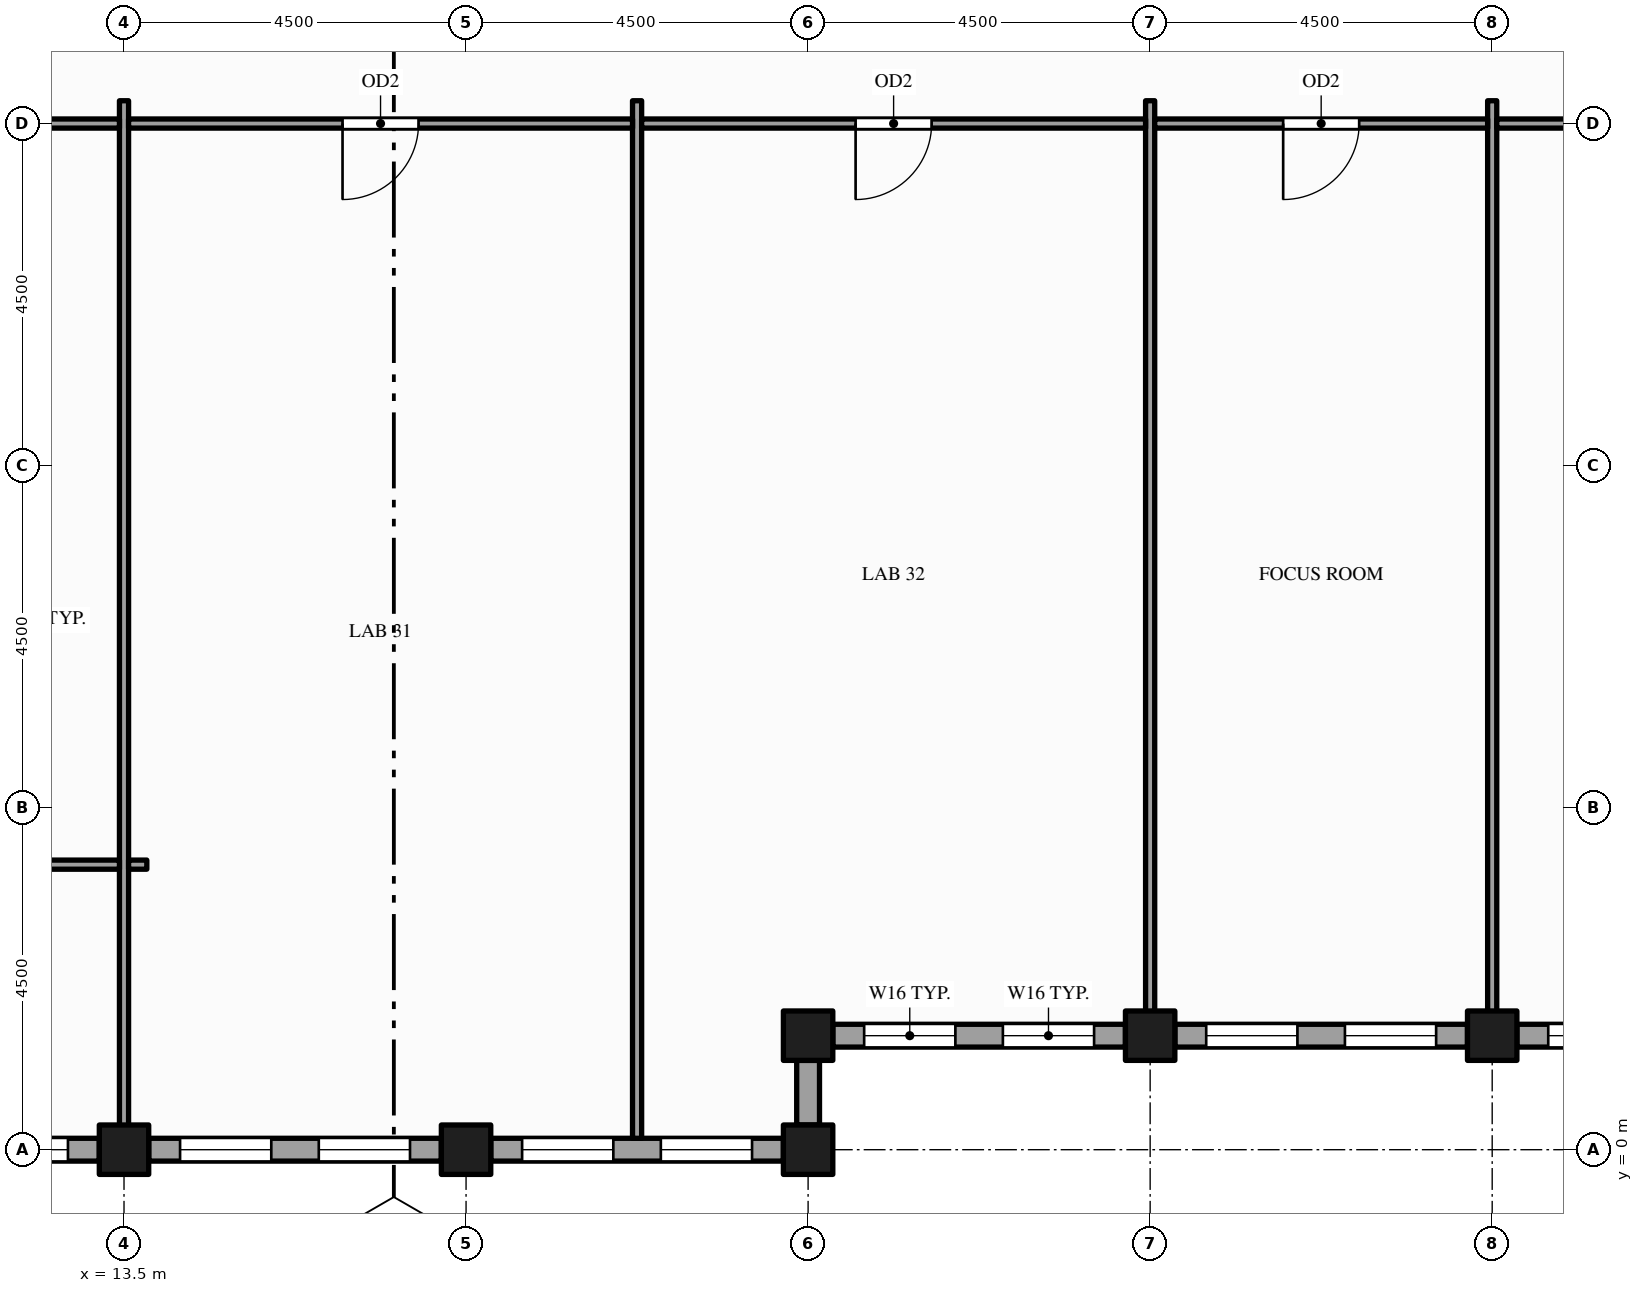
"""IFC4 building model, lengths in metres.
Left out: names, types, materials, properties, quantities, classifications, styles, units other than length and angle.
Written with IfcOpenShell. Run it as: python <this file> out.ifc"""

import sys

from ifc_helpers import new_model, si_unit, direction, frame, frame_2d, origin, origin_2d, place, context, subcontext, project, spatial, rectangle, hollow_rectangle, extrude, element, fill, save


model = new_model("IFC4")
c1 = context("Model", 3, precision=1e-05, world=origin(), true_north=direction((0.0, 1.0)))
c2 = subcontext(c1, "Body", "Model", "MODEL_VIEW")
j1 = project(units=[si_unit("LENGTHUNIT", "METRE"), si_unit("PLANEANGLEUNIT", "RADIAN")], contexts=[c1])
p1 = place(None, origin())
s1 = spatial("IfcSite", under=j1, at=p1, CompositionType="ELEMENT")
p2 = place(p1, origin())
s2 = spatial("IfcBuilding", under=s1, at=p2, CompositionType="ELEMENT")
p3 = place(p2, frame((0.0, 0.0, 281.0)))
s3 = spatial("IfcBuildingStorey", under=s2, at=p3, CompositionType="ELEMENT", Elevation=281.0)
for number, where, z_axis, x_axis in (
    (1, (13.5, 0.0, -0.15), (0.0, 0.0, 1.0), (1.0, 0.0, 0.0)),
    (2, (18.0, 0.0, -0.15), (0.0, 0.0, 1.0), (1.0, 0.0, 0.0)),
    (3, (22.5, 0.0, -0.15), (0.0, 0.0, 1.0), (1.0, 0.0, 0.0)),
    (4, (22.5, 1.5, -0.15), (0.0, 0.0, 1.0), (1.0, 0.0, 0.0)),
    (5, (27.0, 1.5, -0.15), (0.0, 0.0, 1.0), (1.0, 0.0, 0.0)),
    (6, (31.5, 1.5, -0.15), (0.0, 0.0, 1.0), (1.0, 0.0, 0.0)),
):
    element("IfcColumn", number, at=place(p3, frame(where, z_axis=z_axis, x_axis=x_axis)), inside=s3, PredefinedType="COLUMN", context=c2, shape_type="SweptSolid", body=[
        extrude(hollow_rectangle(XDim=0.65, YDim=0.65, WallThickness=0.032, at=origin_2d()), origin(), (0.0, 0.0, 1.0), 4.0),
    ])
p4 = place(p3, frame((22.5, 0.325, 0.0), z_axis=(0.0, 0.0, 1.0), x_axis=(0.0, 1.0, 0.0)))
e7 = element("IfcWall", 7, at=p4, inside=s3, PredefinedType="STANDARD", context=c2, shape_type="SweptSolid", body=[
    extrude(rectangle(XDim=0.85, YDim=0.3, at=frame_2d((0.425, 0.0))), origin(), (0.0, 0.0, 1.0), 3.162),
])
p5 = place(p3, frame((22.825, 1.5, 0.0), z_axis=(0.0, 0.0, 1.0), x_axis=(1.0, 0.0, 0.0)))
e8 = element("IfcWall", 8, at=p5, inside=s3, PredefinedType="STANDARD", context=c2, shape_type="SweptSolid", body=[
    extrude(rectangle(XDim=3.85, YDim=0.3, at=frame_2d((1.925, 0.0))), origin(), (0.0, 0.0, 1.0), 2.87),
])
p6 = place(p5, frame((0.413, 0.0, 0.9)))
e9 = element("IfcOpeningElement", 9, at=p6, cuts=e8, PredefinedType="OPENING", context=c2, shape_type="SweptSolid", body=[
    extrude(rectangle(XDim=1.2, YDim=1.75, at=frame_2d((0.6, 0.875))), frame((0.0, 0.16, 0.0), z_axis=(0.0, -1.0, 0.0), x_axis=(1.0, 0.0, 0.0)), (0.0, 0.0, 1.0), 0.32),
])
p7 = place(p5, frame((2.238, 0.0, 0.9)))
e10 = element("IfcOpeningElement", 10, at=p7, cuts=e8, PredefinedType="OPENING", context=c2, shape_type="SweptSolid", body=[
    extrude(rectangle(XDim=1.2, YDim=1.75, at=frame_2d((0.6, 0.875))), frame((0.0, 0.16, 0.0), z_axis=(0.0, -1.0, 0.0), x_axis=(1.0, 0.0, 0.0)), (0.0, 0.0, 1.0), 0.32),
])
p8 = place(p3, frame((27.325, 1.5, 0.0), z_axis=(0.0, 0.0, 1.0), x_axis=(1.0, 0.0, 0.0)))
e11 = element("IfcWall", 11, at=p8, inside=s3, PredefinedType="STANDARD", context=c2, shape_type="SweptSolid", body=[
    extrude(rectangle(XDim=3.85, YDim=0.3, at=frame_2d((1.925, 0.0))), origin(), (0.0, 0.0, 1.0), 2.87),
])
p9 = place(p8, frame((0.413, 0.0, 0.9)))
e12 = element("IfcOpeningElement", 12, at=p9, cuts=e11, PredefinedType="OPENING", context=c2, shape_type="SweptSolid", body=[
    extrude(rectangle(XDim=1.2, YDim=1.75, at=frame_2d((0.6, 0.875))), frame((0.0, 0.16, 0.0), z_axis=(0.0, -1.0, 0.0), x_axis=(1.0, 0.0, 0.0)), (0.0, 0.0, 1.0), 0.32),
])
p10 = place(p8, frame((2.238, 0.0, 0.9)))
e13 = element("IfcOpeningElement", 13, at=p10, cuts=e11, PredefinedType="OPENING", context=c2, shape_type="SweptSolid", body=[
    extrude(rectangle(XDim=1.2, YDim=1.75, at=frame_2d((0.6, 0.875))), frame((0.0, 0.16, 0.0), z_axis=(0.0, -1.0, 0.0), x_axis=(1.0, 0.0, 0.0)), (0.0, 0.0, 1.0), 0.32),
])
p11 = place(p3, frame((31.825, 1.5, 0.0), z_axis=(0.0, 0.0, 1.0), x_axis=(1.0, 0.0, 0.0)))
e14 = element("IfcWall", 14, at=p11, inside=s3, PredefinedType="STANDARD", context=c2, shape_type="SweptSolid", body=[
    extrude(rectangle(XDim=3.85, YDim=0.3, at=frame_2d((1.925, 0.0))), origin(), (0.0, 0.0, 1.0), 2.87),
])
p12 = place(p11, frame((0.413, 0.0, 0.9)))
e15 = element("IfcOpeningElement", 15, at=p12, cuts=e14, PredefinedType="OPENING", context=c2, shape_type="SweptSolid", body=[
    extrude(rectangle(XDim=1.2, YDim=1.75, at=frame_2d((0.6, 0.875))), frame((0.0, 0.16, 0.0), z_axis=(0.0, -1.0, 0.0), x_axis=(1.0, 0.0, 0.0)), (0.0, 0.0, 1.0), 0.32),
])
p13 = place(p11, frame((2.238, 0.0, 0.9)))
e16 = element("IfcOpeningElement", 16, at=p13, cuts=e14, PredefinedType="OPENING", context=c2, shape_type="SweptSolid", body=[
    extrude(rectangle(XDim=1.2, YDim=1.75, at=frame_2d((0.6, 0.875))), frame((0.0, 0.16, 0.0), z_axis=(0.0, -1.0, 0.0), x_axis=(1.0, 0.0, 0.0)), (0.0, 0.0, 1.0), 0.32),
])
p14 = place(p3, frame((9.325, 0.0, 0.0), z_axis=(0.0, 0.0, 1.0), x_axis=(1.0, 0.0, 0.0)))
e17 = element("IfcWall", 17, at=p14, inside=s3, PredefinedType="STANDARD", context=c2, shape_type="SweptSolid", body=[
    extrude(rectangle(XDim=3.85, YDim=0.3, at=frame_2d((1.925, 0.0))), origin(), (0.0, 0.0, 1.0), 2.87),
])
p15 = place(p14, frame((0.413, 0.0, 0.9)))
e18 = element("IfcOpeningElement", 18, at=p15, cuts=e17, PredefinedType="OPENING", context=c2, shape_type="SweptSolid", body=[
    extrude(rectangle(XDim=1.2, YDim=1.75, at=frame_2d((0.6, 0.875))), frame((0.0, 0.16, 0.0), z_axis=(0.0, -1.0, 0.0), x_axis=(1.0, 0.0, 0.0)), (0.0, 0.0, 1.0), 0.32),
])
p16 = place(p14, frame((2.238, 0.0, 0.9)))
e19 = element("IfcOpeningElement", 19, at=p16, cuts=e17, PredefinedType="OPENING", context=c2, shape_type="SweptSolid", body=[
    extrude(rectangle(XDim=1.2, YDim=1.75, at=frame_2d((0.6, 0.875))), frame((0.0, 0.16, 0.0), z_axis=(0.0, -1.0, 0.0), x_axis=(1.0, 0.0, 0.0)), (0.0, 0.0, 1.0), 0.32),
])
p17 = place(p3, frame((13.825, 0.0, 0.0), z_axis=(0.0, 0.0, 1.0), x_axis=(1.0, 0.0, 0.0)))
e20 = element("IfcWall", 20, at=p17, inside=s3, PredefinedType="STANDARD", context=c2, shape_type="SweptSolid", body=[
    extrude(rectangle(XDim=3.85, YDim=0.3, at=frame_2d((1.925, 0.0))), origin(), (0.0, 0.0, 1.0), 2.87),
])
p18 = place(p17, frame((0.413, 0.0, 0.9)))
e21 = element("IfcOpeningElement", 21, at=p18, cuts=e20, PredefinedType="OPENING", context=c2, shape_type="SweptSolid", body=[
    extrude(rectangle(XDim=1.2, YDim=1.75, at=frame_2d((0.6, 0.875))), frame((0.0, 0.16, 0.0), z_axis=(0.0, -1.0, 0.0), x_axis=(1.0, 0.0, 0.0)), (0.0, 0.0, 1.0), 0.32),
])
p19 = place(p17, frame((2.238, 0.0, 0.9)))
e22 = element("IfcOpeningElement", 22, at=p19, cuts=e20, PredefinedType="OPENING", context=c2, shape_type="SweptSolid", body=[
    extrude(rectangle(XDim=1.2, YDim=1.75, at=frame_2d((0.6, 0.875))), frame((0.0, 0.16, 0.0), z_axis=(0.0, -1.0, 0.0), x_axis=(1.0, 0.0, 0.0)), (0.0, 0.0, 1.0), 0.32),
])
p20 = place(p3, frame((18.325, 0.0, 0.0), z_axis=(0.0, 0.0, 1.0), x_axis=(1.0, 0.0, 0.0)))
e23 = element("IfcWall", 23, at=p20, inside=s3, PredefinedType="STANDARD", context=c2, shape_type="SweptSolid", body=[
    extrude(rectangle(XDim=3.85, YDim=0.3, at=frame_2d((1.925, 0.0))), origin(), (0.0, 0.0, 1.0), 2.87),
])
p21 = place(p20, frame((0.413, 0.0, 0.9)))
e24 = element("IfcOpeningElement", 24, at=p21, cuts=e23, PredefinedType="OPENING", context=c2, shape_type="SweptSolid", body=[
    extrude(rectangle(XDim=1.2, YDim=1.75, at=frame_2d((0.6, 0.875))), frame((0.0, 0.16, 0.0), z_axis=(0.0, -1.0, 0.0), x_axis=(1.0, 0.0, 0.0)), (0.0, 0.0, 1.0), 0.32),
])
p22 = place(p20, frame((2.238, 0.0, 0.9)))
e25 = element("IfcOpeningElement", 25, at=p22, cuts=e23, PredefinedType="OPENING", context=c2, shape_type="SweptSolid", body=[
    extrude(rectangle(XDim=1.2, YDim=1.75, at=frame_2d((0.6, 0.875))), frame((0.0, 0.16, 0.0), z_axis=(0.0, -1.0, 0.0), x_axis=(1.0, 0.0, 0.0)), (0.0, 0.0, 1.0), 0.32),
])
for number, where, z_axis, x_axis in (
    (26, (13.5, 0.15, 0.0), (0.0, 0.0, 1.0), (0.0, 1.0, 0.0)),
    (27, (20.25, 0.15, 0.0), (0.0, 0.0, 1.0), (0.0, 1.0, 0.0)),
):
    element("IfcWall", number, at=place(p3, frame(where, z_axis=z_axis, x_axis=x_axis)), inside=s3, PredefinedType="PARTITIONING", context=c2, shape_type="SweptSolid", body=[
        extrude(rectangle(XDim=13.65, YDim=0.12, at=frame_2d((6.825, 0.0))), origin(), (0.0, 0.0, 1.0), 2.87),
    ])
for number, where, z_axis, x_axis in (
    (28, (27.0, 1.65, 0.0), (0.0, 0.0, 1.0), (0.0, 1.0, 0.0)),
    (29, (31.5, 1.65, 0.0), (0.0, 0.0, 1.0), (0.0, 1.0, 0.0)),
):
    element("IfcWall", number, at=place(p3, frame(where, z_axis=z_axis, x_axis=x_axis)), inside=s3, PredefinedType="PARTITIONING", context=c2, shape_type="SweptSolid", body=[
        extrude(rectangle(XDim=12.15, YDim=0.12, at=frame_2d((6.075, 0.0))), origin(), (0.0, 0.0, 1.0), 2.87),
    ])
p23 = place(p3, frame((9.125, 3.75, 0.0), z_axis=(0.0, 0.0, 1.0), x_axis=(1.0, 0.0, 0.0)))
e30 = element("IfcWall", 30, at=p23, inside=s3, PredefinedType="PARTITIONING", context=c2, shape_type="SweptSolid", body=[
    extrude(rectangle(XDim=4.315, YDim=0.12, at=frame_2d((2.157, 0.0))), origin(), (0.0, 0.0, 1.0), 2.87),
])
p24 = place(p3, frame((13.56, 3.75, 0.0), z_axis=(0.0, 0.0, 1.0), x_axis=(1.0, 0.0, 0.0)))
e31 = element("IfcWall", 31, at=p24, inside=s3, PredefinedType="PARTITIONING", context=c2, shape_type="SweptSolid", body=[
    extrude(rectangle(XDim=0.24, YDim=0.12, at=frame_2d((0.12, 0.0))), origin(), (0.0, 0.0, 1.0), 2.87),
])
p25 = place(p3, frame((0.15, 13.5, 0.0), z_axis=(0.0, 0.0, 1.0), x_axis=(1.0, 0.0, 0.0)))
e32 = element("IfcWall", 32, at=p25, inside=s3, PredefinedType="PARTITIONING", context=c2, shape_type="SweptSolid", body=[
    extrude(rectangle(XDim=13.29, YDim=0.12, at=frame_2d((6.645, 0.0))), origin(), (0.0, 0.0, 1.0), 2.87),
])
p26 = place(p25, frame((6.055, 0.0, 0.0)))
e33 = element("IfcOpeningElement", 33, at=p26, cuts=e32, PredefinedType="OPENING", context=c2, shape_type="SweptSolid", body=[
    extrude(rectangle(XDim=1.2, YDim=2.1, at=frame_2d((0.6, 1.05))), frame((0.0, 0.07, 0.0), z_axis=(0.0, -1.0, 0.0), x_axis=(1.0, 0.0, 0.0)), (0.0, 0.0, 1.0), 0.14),
])
p27 = place(p3, frame((13.56, 13.5, 0.0), z_axis=(0.0, 0.0, 1.0), x_axis=(1.0, 0.0, 0.0)))
e34 = element("IfcWall", 34, at=p27, inside=s3, PredefinedType="PARTITIONING", context=c2, shape_type="SweptSolid", body=[
    extrude(rectangle(XDim=6.63, YDim=0.12, at=frame_2d((3.315, 0.0))), origin(), (0.0, 0.0, 1.0), 2.87),
])
p28 = place(p27, frame((2.815, 0.0, 0.0)))
e35 = element("IfcOpeningElement", 35, at=p28, cuts=e34, PredefinedType="OPENING", context=c2, shape_type="SweptSolid", body=[
    extrude(rectangle(XDim=1.0, YDim=2.1, at=frame_2d((0.5, 1.05))), frame((0.0, 0.07, 0.0), z_axis=(0.0, -1.0, 0.0), x_axis=(1.0, 0.0, 0.0)), (0.0, 0.0, 1.0), 0.14),
])
p29 = place(p3, frame((20.31, 13.5, 0.0), z_axis=(0.0, 0.0, 1.0), x_axis=(1.0, 0.0, 0.0)))
e36 = element("IfcWall", 36, at=p29, inside=s3, PredefinedType="PARTITIONING", context=c2, shape_type="SweptSolid", body=[
    extrude(rectangle(XDim=6.63, YDim=0.12, at=frame_2d((3.315, 0.0))), origin(), (0.0, 0.0, 1.0), 2.87),
])
p30 = place(p29, frame((2.815, 0.0, 0.0)))
e37 = element("IfcOpeningElement", 37, at=p30, cuts=e36, PredefinedType="OPENING", context=c2, shape_type="SweptSolid", body=[
    extrude(rectangle(XDim=1.0, YDim=2.1, at=frame_2d((0.5, 1.05))), frame((0.0, 0.07, 0.0), z_axis=(0.0, -1.0, 0.0), x_axis=(1.0, 0.0, 0.0)), (0.0, 0.0, 1.0), 0.14),
])
p31 = place(p3, frame((27.06, 13.5, 0.0), z_axis=(0.0, 0.0, 1.0), x_axis=(1.0, 0.0, 0.0)))
e38 = element("IfcWall", 38, at=p31, inside=s3, PredefinedType="PARTITIONING", context=c2, shape_type="SweptSolid", body=[
    extrude(rectangle(XDim=4.38, YDim=0.12, at=frame_2d((2.19, 0.0))), origin(), (0.0, 0.0, 1.0), 2.87),
])
p32 = place(p31, frame((1.69, 0.0, 0.0)))
e39 = element("IfcOpeningElement", 39, at=p32, cuts=e38, PredefinedType="OPENING", context=c2, shape_type="SweptSolid", body=[
    extrude(rectangle(XDim=1.0, YDim=2.1, at=frame_2d((0.5, 1.05))), frame((0.0, 0.07, 0.0), z_axis=(0.0, -1.0, 0.0), x_axis=(1.0, 0.0, 0.0)), (0.0, 0.0, 1.0), 0.14),
])
p33 = place(p3, frame((31.56, 13.5, 0.0), z_axis=(0.0, 0.0, 1.0), x_axis=(1.0, 0.0, 0.0)))
e40 = element("IfcWall", 40, at=p33, inside=s3, PredefinedType="PARTITIONING", context=c2, shape_type="SweptSolid", body=[
    extrude(rectangle(XDim=4.38, YDim=0.12, at=frame_2d((2.19, 0.0))), origin(), (0.0, 0.0, 1.0), 2.87),
])
p34 = place(p33, frame((1.59, 0.0, 0.0)))
e41 = element("IfcOpeningElement", 41, at=p34, cuts=e40, PredefinedType="OPENING", context=c2, shape_type="SweptSolid", body=[
    extrude(rectangle(XDim=1.2, YDim=2.1, at=frame_2d((0.6, 1.05))), frame((0.0, 0.07, 0.0), z_axis=(0.0, -1.0, 0.0), x_axis=(1.0, 0.0, 0.0)), (0.0, 0.0, 1.0), 0.14),
])
p35 = place(p6, origin())
e42 = element("IfcWindow", 42, at=p35, inside=s3, PartitioningType="SINGLE_PANEL", PredefinedType="WINDOW", context=c2, shape_type="SweptSolid", body=[
    extrude(rectangle(XDim=1.2, YDim=1.75, at=frame_2d((0.6, 0.875))), frame((0.0, 0.03, 0.0), z_axis=(0.0, -1.0, 0.0), x_axis=(1.0, 0.0, 0.0)), (0.0, 0.0, 1.0), 0.06),
])
fill(e9, e42)
p36 = place(p7, origin())
e43 = element("IfcWindow", 43, at=p36, inside=s3, PartitioningType="SINGLE_PANEL", PredefinedType="WINDOW", context=c2, shape_type="SweptSolid", body=[
    extrude(rectangle(XDim=1.2, YDim=1.75, at=frame_2d((0.6, 0.875))), frame((0.0, 0.03, 0.0), z_axis=(0.0, -1.0, 0.0), x_axis=(1.0, 0.0, 0.0)), (0.0, 0.0, 1.0), 0.06),
])
fill(e10, e43)
p37 = place(p9, origin())
e44 = element("IfcWindow", 44, at=p37, inside=s3, PartitioningType="SINGLE_PANEL", PredefinedType="WINDOW", context=c2, shape_type="SweptSolid", body=[
    extrude(rectangle(XDim=1.2, YDim=1.75, at=frame_2d((0.6, 0.875))), frame((0.0, 0.03, 0.0), z_axis=(0.0, -1.0, 0.0), x_axis=(1.0, 0.0, 0.0)), (0.0, 0.0, 1.0), 0.06),
])
fill(e12, e44)
p38 = place(p10, origin())
e45 = element("IfcWindow", 45, at=p38, inside=s3, PartitioningType="SINGLE_PANEL", PredefinedType="WINDOW", context=c2, shape_type="SweptSolid", body=[
    extrude(rectangle(XDim=1.2, YDim=1.75, at=frame_2d((0.6, 0.875))), frame((0.0, 0.03, 0.0), z_axis=(0.0, -1.0, 0.0), x_axis=(1.0, 0.0, 0.0)), (0.0, 0.0, 1.0), 0.06),
])
fill(e13, e45)
p39 = place(p12, origin())
e46 = element("IfcWindow", 46, at=p39, inside=s3, PartitioningType="SINGLE_PANEL", PredefinedType="WINDOW", context=c2, shape_type="SweptSolid", body=[
    extrude(rectangle(XDim=1.2, YDim=1.75, at=frame_2d((0.6, 0.875))), frame((0.0, 0.03, 0.0), z_axis=(0.0, -1.0, 0.0), x_axis=(1.0, 0.0, 0.0)), (0.0, 0.0, 1.0), 0.06),
])
fill(e15, e46)
p40 = place(p16, origin())
e47 = element("IfcWindow", 47, at=p40, inside=s3, PartitioningType="SINGLE_PANEL", PredefinedType="WINDOW", context=c2, shape_type="SweptSolid", body=[
    extrude(rectangle(XDim=1.2, YDim=1.75, at=frame_2d((0.6, 0.875))), frame((0.0, 0.03, 0.0), z_axis=(0.0, -1.0, 0.0), x_axis=(1.0, 0.0, 0.0)), (0.0, 0.0, 1.0), 0.06),
])
fill(e19, e47)
p41 = place(p18, origin())
e48 = element("IfcWindow", 48, at=p41, inside=s3, PartitioningType="SINGLE_PANEL", PredefinedType="WINDOW", context=c2, shape_type="SweptSolid", body=[
    extrude(rectangle(XDim=1.2, YDim=1.75, at=frame_2d((0.6, 0.875))), frame((0.0, 0.03, 0.0), z_axis=(0.0, -1.0, 0.0), x_axis=(1.0, 0.0, 0.0)), (0.0, 0.0, 1.0), 0.06),
])
fill(e21, e48)
p42 = place(p19, origin())
e49 = element("IfcWindow", 49, at=p42, inside=s3, PartitioningType="SINGLE_PANEL", PredefinedType="WINDOW", context=c2, shape_type="SweptSolid", body=[
    extrude(rectangle(XDim=1.2, YDim=1.75, at=frame_2d((0.6, 0.875))), frame((0.0, 0.03, 0.0), z_axis=(0.0, -1.0, 0.0), x_axis=(1.0, 0.0, 0.0)), (0.0, 0.0, 1.0), 0.06),
])
fill(e22, e49)
p43 = place(p21, origin())
e50 = element("IfcWindow", 50, at=p43, inside=s3, PartitioningType="SINGLE_PANEL", PredefinedType="WINDOW", context=c2, shape_type="SweptSolid", body=[
    extrude(rectangle(XDim=1.2, YDim=1.75, at=frame_2d((0.6, 0.875))), frame((0.0, 0.03, 0.0), z_axis=(0.0, -1.0, 0.0), x_axis=(1.0, 0.0, 0.0)), (0.0, 0.0, 1.0), 0.06),
])
fill(e24, e50)
p44 = place(p22, origin())
e51 = element("IfcWindow", 51, at=p44, inside=s3, PartitioningType="SINGLE_PANEL", PredefinedType="WINDOW", context=c2, shape_type="SweptSolid", body=[
    extrude(rectangle(XDim=1.2, YDim=1.75, at=frame_2d((0.6, 0.875))), frame((0.0, 0.03, 0.0), z_axis=(0.0, -1.0, 0.0), x_axis=(1.0, 0.0, 0.0)), (0.0, 0.0, 1.0), 0.06),
])
fill(e25, e51)
p45 = place(p28, origin())
e52 = element("IfcDoor", 52, at=p45, inside=s3, OperationType="SINGLE_SWING_LEFT", PredefinedType="DOOR", context=c2, shape_type="SweptSolid", body=[
    extrude(rectangle(XDim=1.0, YDim=2.1, at=frame_2d((0.5, 1.05))), frame((0.0, 0.025, 0.0), z_axis=(0.0, -1.0, 0.0), x_axis=(1.0, 0.0, 0.0)), (0.0, 0.0, 1.0), 0.05),
])
fill(e35, e52)
p46 = place(p30, origin())
e53 = element("IfcDoor", 53, at=p46, inside=s3, OperationType="SINGLE_SWING_LEFT", PredefinedType="DOOR", context=c2, shape_type="SweptSolid", body=[
    extrude(rectangle(XDim=1.0, YDim=2.1, at=frame_2d((0.5, 1.05))), frame((0.0, 0.025, 0.0), z_axis=(0.0, -1.0, 0.0), x_axis=(1.0, 0.0, 0.0)), (0.0, 0.0, 1.0), 0.05),
])
fill(e37, e53)
p47 = place(p32, origin())
e54 = element("IfcDoor", 54, at=p47, inside=s3, OperationType="SINGLE_SWING_LEFT", PredefinedType="DOOR", context=c2, shape_type="SweptSolid", body=[
    extrude(rectangle(XDim=1.0, YDim=2.1, at=frame_2d((0.5, 1.05))), frame((0.0, 0.025, 0.0), z_axis=(0.0, -1.0, 0.0), x_axis=(1.0, 0.0, 0.0)), (0.0, 0.0, 1.0), 0.05),
])
fill(e39, e54)
save(model, sys.argv[1])
